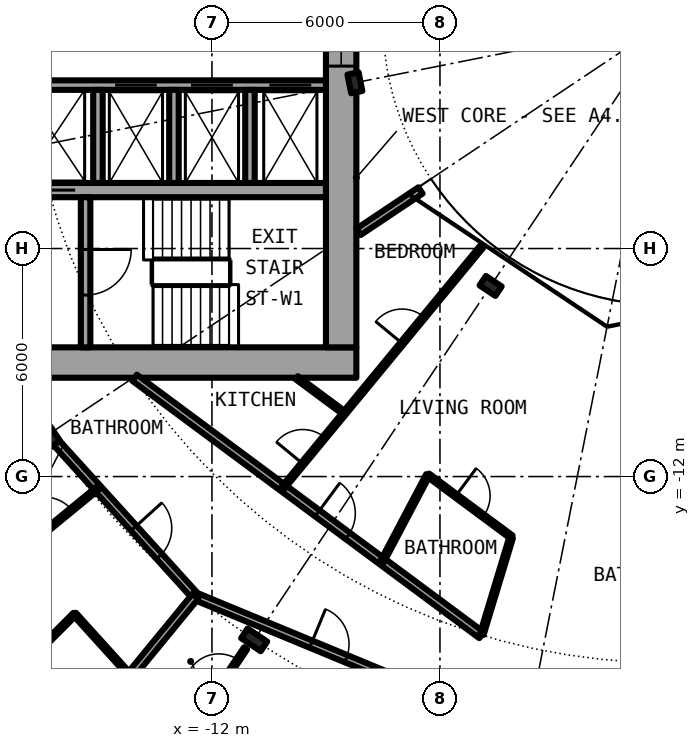
"""IFC4 building model, lengths in metres.
Left out: names, types, materials, properties, quantities, classifications, styles, units other than length and angle.
Written with IfcOpenShell. Run it as: python <this file> out.ifc"""

import sys

from ifc_helpers import new_model, si_unit, direction, frame, frame_2d, origin, origin_2d, place, context, subcontext, project, spatial, rectangle, i_section, extrude, element, fill, save


model = new_model("IFC4")
c1 = context("Model", 3, precision=1e-05, world=origin(), true_north=direction((0.0, 1.0)))
c2 = subcontext(c1, "Body", "Model", "MODEL_VIEW")
j1 = project(units=[si_unit("LENGTHUNIT", "METRE"), si_unit("PLANEANGLEUNIT", "RADIAN")], contexts=[c1])
p1 = place(None, origin())
s1 = spatial("IfcSite", under=j1, at=p1, CompositionType="ELEMENT")
p2 = place(p1, origin())
s2 = spatial("IfcBuilding", under=s1, at=p2, CompositionType="ELEMENT")
p3 = place(p2, frame((0.0, 0.0, 47.2)))
s3 = spatial("IfcBuildingStorey", under=s2, at=p3, CompositionType="ELEMENT", Elevation=47.2)
for number, where, z_axis, x_axis in (
    (1, (-16.297, -10.889, 0.0), (0.0, 0.0, 1.0), (-0.831, -0.556, 0.0)),
    (2, (-10.889, -16.297, 0.0), (0.0, 0.0, 1.0), (-0.556, -0.831, 0.0)),
):
    element("IfcColumn", number, at=place(p3, frame(where, z_axis=z_axis, x_axis=x_axis)), inside=s3, PredefinedType="COLUMN", context=c2, shape_type="SweptSolid", body=[
        extrude(i_section(OverallWidth=0.305, OverallDepth=0.62, WebThickness=0.021, FlangeThickness=0.04, FilletRadius=0.027, at=origin_2d()), origin(), (0.0, 0.0, 1.0), 3.05),
    ])
for number, where, z_axis, x_axis in (
    (3, (-8.239, -1.639, 0.0), (0.0, 0.0, 1.0), (-0.981, -0.195, 0.0)),
    (4, (-4.667, -6.984, 0.0), (0.0, 0.0, 1.0), (-0.556, -0.831, 0.0)),
):
    element("IfcColumn", number, at=place(p3, frame(where, z_axis=z_axis, x_axis=x_axis)), inside=s3, PredefinedType="COLUMN", context=c2, shape_type="SweptSolid", body=[
        extrude(i_section(OverallWidth=0.3, OverallDepth=0.5, WebThickness=0.014, FlangeThickness=0.028, FilletRadius=0.027, at=origin_2d()), origin(), (0.0, 0.0, 1.0), 3.05),
    ])
p4 = place(p3, frame((-22.4, -9.0, 0.0), z_axis=(0.0, 0.0, 1.0), x_axis=(1.0, 0.0, 0.0)))
e5 = element("IfcWall", 5, at=p4, inside=s3, PredefinedType="SHEAR", context=c2, shape_type="SweptSolid", body=[
    extrude(rectangle(XDim=14.2, YDim=0.8, at=frame_2d((7.1, 0.0))), origin(), (0.0, 0.0, 1.0), 3.05),
])
p5 = place(p4, frame((1.325, 0.0, 0.0)))
e6 = element("IfcOpeningElement", 6, at=p5, cuts=e5, PredefinedType="OPENING", context=c2, shape_type="SweptSolid", body=[
    extrude(rectangle(XDim=1.2, YDim=2.3, at=frame_2d((0.6, 1.15))), frame((0.0, 0.41, 0.0), z_axis=(0.0, -1.0, 0.0), x_axis=(1.0, 0.0, 0.0)), (0.0, 0.0, 1.0), 0.82),
])
p6 = place(p3, frame((-8.6, 8.6, 0.0), z_axis=(0.0, 0.0, 1.0), x_axis=(0.0, -1.0, 0.0)))
e7 = element("IfcWall", 7, at=p6, inside=s3, PredefinedType="SHEAR", context=c2, shape_type="SweptSolid", body=[
    extrude(rectangle(XDim=17.2, YDim=0.8, at=frame_2d((8.6, 0.0))), origin(), (0.0, 0.0, 1.0), 3.05),
])
p7 = place(p6, frame((7.4, 0.0, 0.1)))
e8 = element("IfcOpeningElement", 8, at=p7, cuts=e7, PredefinedType="OPENING", context=c2, shape_type="SweptSolid", body=[
    extrude(rectangle(XDim=2.4, YDim=2.2, at=frame_2d((1.2, 1.1))), frame((0.0, 0.41, 0.0), z_axis=(0.0, -1.0, 0.0), x_axis=(1.0, 0.0, 0.0)), (0.0, 0.0, 1.0), 0.82),
])
p8 = place(p3, frame((-9.0, -1.7, 0.0), z_axis=(0.0, 0.0, 1.0), x_axis=(-1.0, 0.0, 0.0)))
e9 = element("IfcWall", 9, at=p8, inside=s3, PredefinedType="SHEAR", context=c2, shape_type="SweptSolid", body=[
    extrude(rectangle(XDim=10.15, YDim=0.25, at=frame_2d((5.075, 0.0))), origin(), (0.0, 0.0, 1.0), 3.05),
])
p9 = place(p8, frame((0.387, 0.0, 0.0)))
e10 = element("IfcOpeningElement", 10, at=p9, cuts=e9, PredefinedType="OPENING", context=c2, shape_type="SweptSolid", body=[
    extrude(rectangle(XDim=1.1, YDim=2.3, at=frame_2d((0.55, 1.15))), frame((0.0, 0.135, 0.0), z_axis=(0.0, -1.0, 0.0), x_axis=(1.0, 0.0, 0.0)), (0.0, 0.0, 1.0), 0.27),
])
p10 = place(p8, frame((2.45, 0.0, 0.0)))
e11 = element("IfcOpeningElement", 11, at=p10, cuts=e9, PredefinedType="OPENING", context=c2, shape_type="SweptSolid", body=[
    extrude(rectangle(XDim=1.1, YDim=2.3, at=frame_2d((0.55, 1.15))), frame((0.0, 0.135, 0.0), z_axis=(0.0, -1.0, 0.0), x_axis=(1.0, 0.0, 0.0)), (0.0, 0.0, 1.0), 0.27),
])
p11 = place(p8, frame((4.45, 0.0, 0.0)))
e12 = element("IfcOpeningElement", 12, at=p11, cuts=e9, PredefinedType="OPENING", context=c2, shape_type="SweptSolid", body=[
    extrude(rectangle(XDim=1.1, YDim=2.3, at=frame_2d((0.55, 1.15))), frame((0.0, 0.135, 0.0), z_axis=(0.0, -1.0, 0.0), x_axis=(1.0, 0.0, 0.0)), (0.0, 0.0, 1.0), 0.27),
])
p12 = place(p3, frame((-9.0, -4.462, 0.0), z_axis=(0.0, 0.0, 1.0), x_axis=(-1.0, 0.0, 0.0)))
e13 = element("IfcWall", 13, at=p12, inside=s3, PredefinedType="SHEAR", context=c2, shape_type="SweptSolid", body=[
    extrude(rectangle(XDim=10.15, YDim=0.375, at=frame_2d((5.075, 0.0))), origin(), (0.0, 0.0, 1.0), 3.05),
])
p13 = place(p12, frame((6.6, 0.0, 0.0)))
e14 = element("IfcOpeningElement", 14, at=p13, cuts=e13, PredefinedType="OPENING", context=c2, shape_type="SweptSolid", body=[
    extrude(rectangle(XDim=1.1, YDim=2.3, at=frame_2d((0.55, 1.15))), frame((0.0, 0.198, 0.0), z_axis=(0.0, -1.0, 0.0), x_axis=(1.0, 0.0, 0.0)), (0.0, 0.0, 1.0), 0.395),
])
p14 = place(p3, frame((-15.325, -4.65, 0.0), z_axis=(0.0, 0.0, 1.0), x_axis=(0.0, -1.0, 0.0)))
e15 = element("IfcWall", 15, at=p14, inside=s3, PredefinedType="SHEAR", context=c2, shape_type="SweptSolid", body=[
    extrude(rectangle(XDim=3.95, YDim=0.25, at=frame_2d((1.975, 0.0))), origin(), (0.0, 0.0, 1.0), 3.05),
])
p15 = place(p14, frame((1.375, 0.0, 0.0)))
e16 = element("IfcOpeningElement", 16, at=p15, cuts=e15, PredefinedType="OPENING", context=c2, shape_type="SweptSolid", body=[
    extrude(rectangle(XDim=1.2, YDim=2.3, at=frame_2d((0.6, 1.15))), frame((0.0, 0.135, 0.0), z_axis=(0.0, -1.0, 0.0), x_axis=(1.0, 0.0, 0.0)), (0.0, 0.0, 1.0), 0.27),
])
for number, where, z_axis, x_axis in (
    (17, (-15.0, -1.825, 0.0), (0.0, 0.0, 1.0), (0.0, -1.0, 0.0)),
    (18, (-11.0, -1.825, 0.0), (0.0, 0.0, 1.0), (0.0, -1.0, 0.0)),
    (19, (-13.0, -1.825, 0.0), (0.0, 0.0, 1.0), (0.0, -1.0, 0.0)),
):
    element("IfcWall", number, at=place(p3, frame(where, z_axis=z_axis, x_axis=x_axis)), inside=s3, PredefinedType="SOLIDWALL", context=c2, shape_type="SweptSolid", body=[
        extrude(rectangle(XDim=2.45, YDim=0.25, at=frame_2d((1.225, 0.0))), origin(), (0.0, 0.0, 1.0), 2.7),
    ])
p16 = place(p3, frame((-15.617, -15.617, 0.0), z_axis=(0.0, 0.0, 1.0), x_axis=(0.671144831591, -0.741326254107, 0.0)))
e20 = element("IfcWall", 20, at=p16, inside=s3, PredefinedType="PARTITIONING", context=c2, shape_type="SweptSolid", body=[
    extrude(rectangle(XDim=2.181, YDim=0.1, at=frame_2d((1.091, 0.0))), origin(), (0.0, 0.0, 1.0), 2.7),
])
p17 = place(p3, frame((-16.193, -11.003, 0.0), z_axis=(0.0, 0.0, 1.0), x_axis=(0.671514934772, -0.740991020444, 0.0)))
e21 = element("IfcWall", 21, at=p17, inside=s3, PredefinedType="PARTITIONING", context=c2, shape_type="SweptSolid", body=[
    extrude(rectangle(XDim=5.598, YDim=0.2, at=frame_2d((2.799, 0.0))), origin(), (0.0, 0.0, 1.0), 2.38),
])
p18 = place(p17, frame((3.18, 0.0, 0.0)))
e22 = element("IfcOpeningElement", 22, at=p18, cuts=e21, PredefinedType="OPENING", context=c2, shape_type="SweptSolid", body=[
    extrude(rectangle(XDim=1.0, YDim=2.3, at=frame_2d((0.5, 1.15))), frame((0.0, 0.11, 0.0), z_axis=(0.0, -1.0, 0.0), x_axis=(1.0, 0.0, 0.0)), (0.0, 0.0, 1.0), 0.22),
])
p19 = place(p3, frame((-12.434, -15.151, 0.0), z_axis=(0.0, 0.0, 1.0), x_axis=(0.923888467236, -0.382661861319, 0.0)))
e23 = element("IfcWall", 23, at=p19, inside=s3, PredefinedType="PARTITIONING", context=c2, shape_type="SweptSolid", body=[
    extrude(rectangle(XDim=11.381, YDim=0.2, at=frame_2d((5.691, 0.0))), origin(), (0.0, 0.0, 1.0), 2.7),
])
p20 = place(p19, frame((3.292, 0.0, 0.0)))
e24 = element("IfcOpeningElement", 24, at=p20, cuts=e23, PredefinedType="OPENING", context=c2, shape_type="SweptSolid", body=[
    extrude(rectangle(XDim=1.0, YDim=2.3, at=frame_2d((0.5, 1.15))), frame((0.0, 0.11, 0.0), z_axis=(0.0, -1.0, 0.0), x_axis=(1.0, 0.0, 0.0)), (0.0, 0.0, 1.0), 0.22),
])
p21 = place(p3, frame((-14.037, -9.4, 0.0), z_axis=(0.0, 0.0, 1.0), x_axis=(0.803202106898, -0.595706618626, 0.0)))
e25 = element("IfcWall", 25, at=p21, inside=s3, PredefinedType="PARTITIONING", context=c2, shape_type="SweptSolid", body=[
    extrude(rectangle(XDim=11.368, YDim=0.2, at=frame_2d((5.684, 0.0))), origin(), (0.0, 0.0, 1.0), 2.7),
])
p22 = place(p21, frame((5.988, 0.0, 0.0)))
e26 = element("IfcOpeningElement", 26, at=p22, cuts=e25, PredefinedType="OPENING", context=c2, shape_type="SweptSolid", body=[
    extrude(rectangle(XDim=1.0, YDim=2.3, at=frame_2d((0.5, 1.15))), frame((0.0, 0.11, 0.0), z_axis=(0.0, -1.0, 0.0), x_axis=(1.0, 0.0, 0.0)), (0.0, 0.0, 1.0), 0.22),
])
p23 = place(p3, frame((-9.77, -9.4, 0.0), z_axis=(0.0, 0.0, 1.0), x_axis=(0.803264156882, -0.595622946392, 0.0)))
e27 = element("IfcWall", 27, at=p23, inside=s3, PredefinedType="PARTITIONING", context=c2, shape_type="SweptSolid", body=[
    extrude(rectangle(XDim=1.565, YDim=0.1, at=frame_2d((0.782, 0.0))), origin(), (0.0, 0.0, 1.0), 2.7),
])
p24 = place(p3, frame((-6.315, -11.961, 0.0), z_axis=(0.0, 0.0, 1.0), x_axis=(0.803128348509, -0.595806055542, 0.0)))
e28 = element("IfcWall", 28, at=p24, inside=s3, PredefinedType="PARTITIONING", context=c2, shape_type="SweptSolid", body=[
    extrude(rectangle(XDim=2.734, YDim=0.1, at=frame_2d((1.367, 0.0))), origin(), (0.0, 0.0, 1.0), 2.7),
])
p25 = place(p24, frame((0.914, 0.0, 0.0)))
e29 = element("IfcOpeningElement", 29, at=p25, cuts=e28, PredefinedType="OPENING", context=c2, shape_type="SweptSolid", body=[
    extrude(rectangle(XDim=0.9, YDim=2.3, at=frame_2d((0.45, 1.15))), frame((0.0, 0.06, 0.0), z_axis=(0.0, -1.0, 0.0), x_axis=(1.0, 0.0, 0.0)), (0.0, 0.0, 1.0), 0.12),
])
p26 = place(p3, frame((-6.513, -4.472, 0.0), z_axis=(0.0, 0.0, 1.0), x_axis=(-0.831417956244, -0.555647533996, 0.0)))
e30 = element("IfcWall", 30, at=p26, inside=s3, PredefinedType="PARTITIONING", context=c2, shape_type="SweptSolid", body=[
    extrude(rectangle(XDim=1.962, YDim=0.2, at=frame_2d((0.981, 0.0))), origin(), (0.0, 0.0, 1.0), 2.7),
])
p27 = place(p3, frame((-19.21, -19.222, 0.0), z_axis=(0.0, 0.0, 1.0), x_axis=(0.706914880313, 0.707298629994, 0.0)))
e31 = element("IfcWall", 31, at=p27, inside=s3, PredefinedType="PARTITIONING", context=c2, shape_type="SweptSolid", body=[
    extrude(rectangle(XDim=5.09, YDim=0.1, at=frame_2d((2.545, 0.0))), origin(), (0.0, 0.0, 1.0), 2.7),
])
p28 = place(p27, frame((2.095, 0.0, 0.0)))
e32 = element("IfcOpeningElement", 32, at=p28, cuts=e31, PredefinedType="OPENING", context=c2, shape_type="SweptSolid", body=[
    extrude(rectangle(XDim=0.9, YDim=2.3, at=frame_2d((0.45, 1.15))), frame((0.0, 0.06, 0.0), z_axis=(0.0, -1.0, 0.0), x_axis=(1.0, 0.0, 0.0)), (0.0, 0.0, 1.0), 0.12),
])
p29 = place(p3, frame((-17.241, -21.006, 0.0), z_axis=(0.0, 0.0, 1.0), x_axis=(0.634381303318, 0.773020285633, 0.0)))
e33 = element("IfcWall", 33, at=p29, inside=s3, PredefinedType="PARTITIONING", context=c2, shape_type="SweptSolid", body=[
    extrude(rectangle(XDim=7.576, YDim=0.2, at=frame_2d((3.788, 0.0))), origin(), (0.0, 0.0, 1.0), 2.7),
])
p30 = place(p3, frame((-17.077, -14.006, 0.0), z_axis=(0.0, 0.0, 1.0), x_axis=(0.77319617123, 0.634166918717, 0.0)))
e34 = element("IfcWall", 34, at=p30, inside=s3, PredefinedType="PARTITIONING", context=c2, shape_type="SweptSolid", body=[
    extrude(rectangle(XDim=2.675, YDim=0.1, at=frame_2d((1.337, 0.0))), origin(), (0.0, 0.0, 1.0), 2.7),
])
p31 = place(p30, frame((0.887, 0.0, 0.0)))
e35 = element("IfcOpeningElement", 35, at=p31, cuts=e34, PredefinedType="OPENING", context=c2, shape_type="SweptSolid", body=[
    extrude(rectangle(XDim=0.9, YDim=2.3, at=frame_2d((0.45, 1.15))), frame((0.0, 0.06, 0.0), z_axis=(0.0, -1.0, 0.0), x_axis=(1.0, 0.0, 0.0)), (0.0, 0.0, 1.0), 0.12),
])
p32 = place(p3, frame((-12.153, -18.064, 0.0), z_axis=(0.0, 0.0, 1.0), x_axis=(0.558084773293, 0.829783939239, 0.0)))
e36 = element("IfcWall", 36, at=p32, inside=s3, PredefinedType="PARTITIONING", context=c2, shape_type="SweptSolid", body=[
    extrude(rectangle(XDim=1.862, YDim=0.1, at=frame_2d((0.931, 0.0))), origin(), (0.0, 0.0, 1.0), 2.7),
])
p33 = place(p32, frame((0.6, 0.0, 0.0)))
e37 = element("IfcOpeningElement", 37, at=p33, cuts=e36, PredefinedType="OPENING", context=c2, shape_type="SweptSolid", body=[
    extrude(rectangle(XDim=0.9, YDim=2.3, at=frame_2d((0.45, 1.15))), frame((0.0, 0.06, 0.0), z_axis=(0.0, -1.0, 0.0), x_axis=(1.0, 0.0, 0.0)), (0.0, 0.0, 1.0), 0.12),
])
p34 = place(p3, frame((-10.132, -12.296, 0.0), z_axis=(0.0, 0.0, 1.0), x_axis=(0.636105207978, 0.771602335652, 0.0)))
e38 = element("IfcWall", 38, at=p34, inside=s3, PredefinedType="PARTITIONING", context=c2, shape_type="SweptSolid", body=[
    extrude(rectangle(XDim=8.213, YDim=0.1, at=frame_2d((4.106, 0.0))), origin(), (0.0, 0.0, 1.0), 2.7),
])
p35 = place(p34, frame((0.821, 0.0, 0.0)))
e39 = element("IfcOpeningElement", 39, at=p35, cuts=e38, PredefinedType="OPENING", context=c2, shape_type="SweptSolid", body=[
    extrude(rectangle(XDim=0.9, YDim=2.3, at=frame_2d((0.45, 1.15))), frame((0.0, 0.06, 0.0), z_axis=(0.0, -1.0, 0.0), x_axis=(1.0, 0.0, 0.0)), (0.0, 0.0, 1.0), 0.12),
])
p36 = place(p34, frame((4.929, 0.0, 0.0)))
e40 = element("IfcOpeningElement", 40, at=p36, cuts=e38, PredefinedType="OPENING", context=c2, shape_type="SweptSolid", body=[
    extrude(rectangle(XDim=0.9, YDim=2.3, at=frame_2d((0.45, 1.15))), frame((0.0, 0.06, 0.0), z_axis=(0.0, -1.0, 0.0), x_axis=(1.0, 0.0, 0.0)), (0.0, 0.0, 1.0), 0.12),
])
p37 = place(p3, frame((-7.519, -14.234, 0.0), z_axis=(0.0, 0.0, 1.0), x_axis=(0.467001992543, 0.884256263173, 0.0)))
e41 = element("IfcWall", 41, at=p37, inside=s3, PredefinedType="PARTITIONING", context=c2, shape_type="SweptSolid", body=[
    extrude(rectangle(XDim=2.572, YDim=0.1, at=frame_2d((1.286, 0.0))), origin(), (0.0, 0.0, 1.0), 2.7),
])
p38 = place(p3, frame((-4.128, -13.609, 0.0), z_axis=(0.0, 0.0, 1.0), x_axis=(-0.290456070925, -0.956888327269, 0.0)))
e42 = element("IfcWall", 42, at=p38, inside=s3, PredefinedType="PARTITIONING", context=c2, shape_type="SweptSolid", body=[
    extrude(rectangle(XDim=2.658, YDim=0.1, at=frame_2d((1.329, 0.0))), origin(), (0.0, 0.0, 1.0), 2.7),
])
p39 = place(p9, origin())
e43 = element("IfcDoor", 43, at=p39, inside=s3, OperationType="DOUBLE_DOOR_SLIDING", PredefinedType="DOOR", context=c2, shape_type="SweptSolid", body=[
    extrude(rectangle(XDim=1.1, YDim=2.3, at=frame_2d((0.55, 1.15))), frame((0.0, 0.025, 0.0), z_axis=(0.0, -1.0, 0.0), x_axis=(1.0, 0.0, 0.0)), (0.0, 0.0, 1.0), 0.05),
])
fill(e10, e43)
p40 = place(p10, origin())
e44 = element("IfcDoor", 44, at=p40, inside=s3, OperationType="DOUBLE_DOOR_SLIDING", PredefinedType="DOOR", context=c2, shape_type="SweptSolid", body=[
    extrude(rectangle(XDim=1.1, YDim=2.3, at=frame_2d((0.55, 1.15))), frame((0.0, 0.025, 0.0), z_axis=(0.0, -1.0, 0.0), x_axis=(1.0, 0.0, 0.0)), (0.0, 0.0, 1.0), 0.05),
])
fill(e11, e44)
p41 = place(p11, origin())
e45 = element("IfcDoor", 45, at=p41, inside=s3, OperationType="DOUBLE_DOOR_SLIDING", PredefinedType="DOOR", context=c2, shape_type="SweptSolid", body=[
    extrude(rectangle(XDim=1.1, YDim=2.3, at=frame_2d((0.55, 1.15))), frame((0.0, 0.025, 0.0), z_axis=(0.0, -1.0, 0.0), x_axis=(1.0, 0.0, 0.0)), (0.0, 0.0, 1.0), 0.05),
])
fill(e12, e45)
p42 = place(p13, origin())
e46 = element("IfcDoor", 46, at=p42, inside=s3, OperationType="DOUBLE_DOOR_SLIDING", PredefinedType="DOOR", context=c2, shape_type="SweptSolid", body=[
    extrude(rectangle(XDim=1.1, YDim=2.3, at=frame_2d((0.55, 1.15))), frame((0.0, 0.025, 0.0), z_axis=(0.0, -1.0, 0.0), x_axis=(1.0, 0.0, 0.0)), (0.0, 0.0, 1.0), 0.05),
])
fill(e14, e46)
p43 = place(p15, origin())
e47 = element("IfcDoor", 47, at=p43, inside=s3, OperationType="SINGLE_SWING_LEFT", PredefinedType="DOOR", context=c2, shape_type="SweptSolid", body=[
    extrude(rectangle(XDim=1.2, YDim=2.3, at=frame_2d((0.6, 1.15))), frame((0.0, 0.025, 0.0), z_axis=(0.0, -1.0, 0.0), x_axis=(1.0, 0.0, 0.0)), (0.0, 0.0, 1.0), 0.05),
])
fill(e16, e47)
p44 = place(p7, origin())
e48 = element("IfcWindow", 48, at=p44, inside=s3, PartitioningType="SINGLE_PANEL", PredefinedType="WINDOW", context=c2, shape_type="SweptSolid", body=[
    extrude(rectangle(XDim=2.4, YDim=2.2, at=frame_2d((1.2, 1.1))), frame((0.0, 0.03, 0.0), z_axis=(0.0, -1.0, 0.0), x_axis=(1.0, 0.0, 0.0)), (0.0, 0.0, 1.0), 0.06),
])
fill(e8, e48)
p45 = place(p18, origin())
e49 = element("IfcDoor", 49, at=p45, inside=s3, OperationType="SINGLE_SWING_RIGHT", PredefinedType="DOOR", context=c2, shape_type="SweptSolid", body=[
    extrude(rectangle(XDim=1.0, YDim=2.3, at=frame_2d((0.5, 1.15))), frame((0.0, 0.025, 0.0), z_axis=(0.0, -1.0, 0.0), x_axis=(1.0, 0.0, 0.0)), (0.0, 0.0, 1.0), 0.05),
])
fill(e22, e49)
p46 = place(p31, origin())
e50 = element("IfcDoor", 50, at=p46, inside=s3, OperationType="SINGLE_SWING_LEFT", PredefinedType="DOOR", context=c2, shape_type="SweptSolid", body=[
    extrude(rectangle(XDim=0.9, YDim=2.3, at=frame_2d((0.45, 1.15))), frame((0.0, 0.025, 0.0), z_axis=(0.0, -1.0, 0.0), x_axis=(1.0, 0.0, 0.0)), (0.0, 0.0, 1.0), 0.05),
])
fill(e35, e50)
p47 = place(p20, origin())
e51 = element("IfcDoor", 51, at=p47, inside=s3, OperationType="SINGLE_SWING_LEFT", PredefinedType="DOOR", context=c2, shape_type="SweptSolid", body=[
    extrude(rectangle(XDim=1.0, YDim=2.3, at=frame_2d((0.5, 1.15))), frame((0.0, 0.025, 0.0), z_axis=(0.0, -1.0, 0.0), x_axis=(1.0, 0.0, 0.0)), (0.0, 0.0, 1.0), 0.05),
])
fill(e24, e51)
p48 = place(p33, origin())
e52 = element("IfcDoor", 52, at=p48, inside=s3, OperationType="SINGLE_SWING_RIGHT", PredefinedType="DOOR", context=c2, shape_type="SweptSolid", body=[
    extrude(rectangle(XDim=0.9, YDim=2.3, at=frame_2d((0.45, 1.15))), frame((0.0, 0.025, 0.0), z_axis=(0.0, -1.0, 0.0), x_axis=(1.0, 0.0, 0.0)), (0.0, 0.0, 1.0), 0.05),
])
fill(e37, e52)
p49 = place(p22, origin())
e53 = element("IfcDoor", 53, at=p49, inside=s3, OperationType="SINGLE_SWING_RIGHT", PredefinedType="DOOR", context=c2, shape_type="SweptSolid", body=[
    extrude(rectangle(XDim=1.0, YDim=2.3, at=frame_2d((0.5, 1.15))), frame((0.0, 0.025, 0.0), z_axis=(0.0, -1.0, 0.0), x_axis=(1.0, 0.0, 0.0)), (0.0, 0.0, 1.0), 0.05),
])
fill(e26, e53)
p50 = place(p25, origin())
e54 = element("IfcDoor", 54, at=p50, inside=s3, OperationType="SINGLE_SWING_LEFT", PredefinedType="DOOR", context=c2, shape_type="SweptSolid", body=[
    extrude(rectangle(XDim=0.9, YDim=2.3, at=frame_2d((0.45, 1.15))), frame((0.0, 0.025, 0.0), z_axis=(0.0, -1.0, 0.0), x_axis=(1.0, 0.0, 0.0)), (0.0, 0.0, 1.0), 0.05),
])
fill(e29, e54)
p51 = place(p35, origin())
e55 = element("IfcDoor", 55, at=p51, inside=s3, OperationType="SINGLE_SWING_LEFT", PredefinedType="DOOR", context=c2, shape_type="SweptSolid", body=[
    extrude(rectangle(XDim=0.9, YDim=2.3, at=frame_2d((0.45, 1.15))), frame((0.0, 0.025, 0.0), z_axis=(0.0, -1.0, 0.0), x_axis=(1.0, 0.0, 0.0)), (0.0, 0.0, 1.0), 0.05),
])
fill(e39, e55)
p52 = place(p36, origin())
e56 = element("IfcDoor", 56, at=p52, inside=s3, OperationType="SINGLE_SWING_RIGHT", PredefinedType="DOOR", context=c2, shape_type="SweptSolid", body=[
    extrude(rectangle(XDim=0.9, YDim=2.3, at=frame_2d((0.45, 1.15))), frame((0.0, 0.025, 0.0), z_axis=(0.0, -1.0, 0.0), x_axis=(1.0, 0.0, 0.0)), (0.0, 0.0, 1.0), 0.05),
])
fill(e40, e56)
save(model, sys.argv[1])
